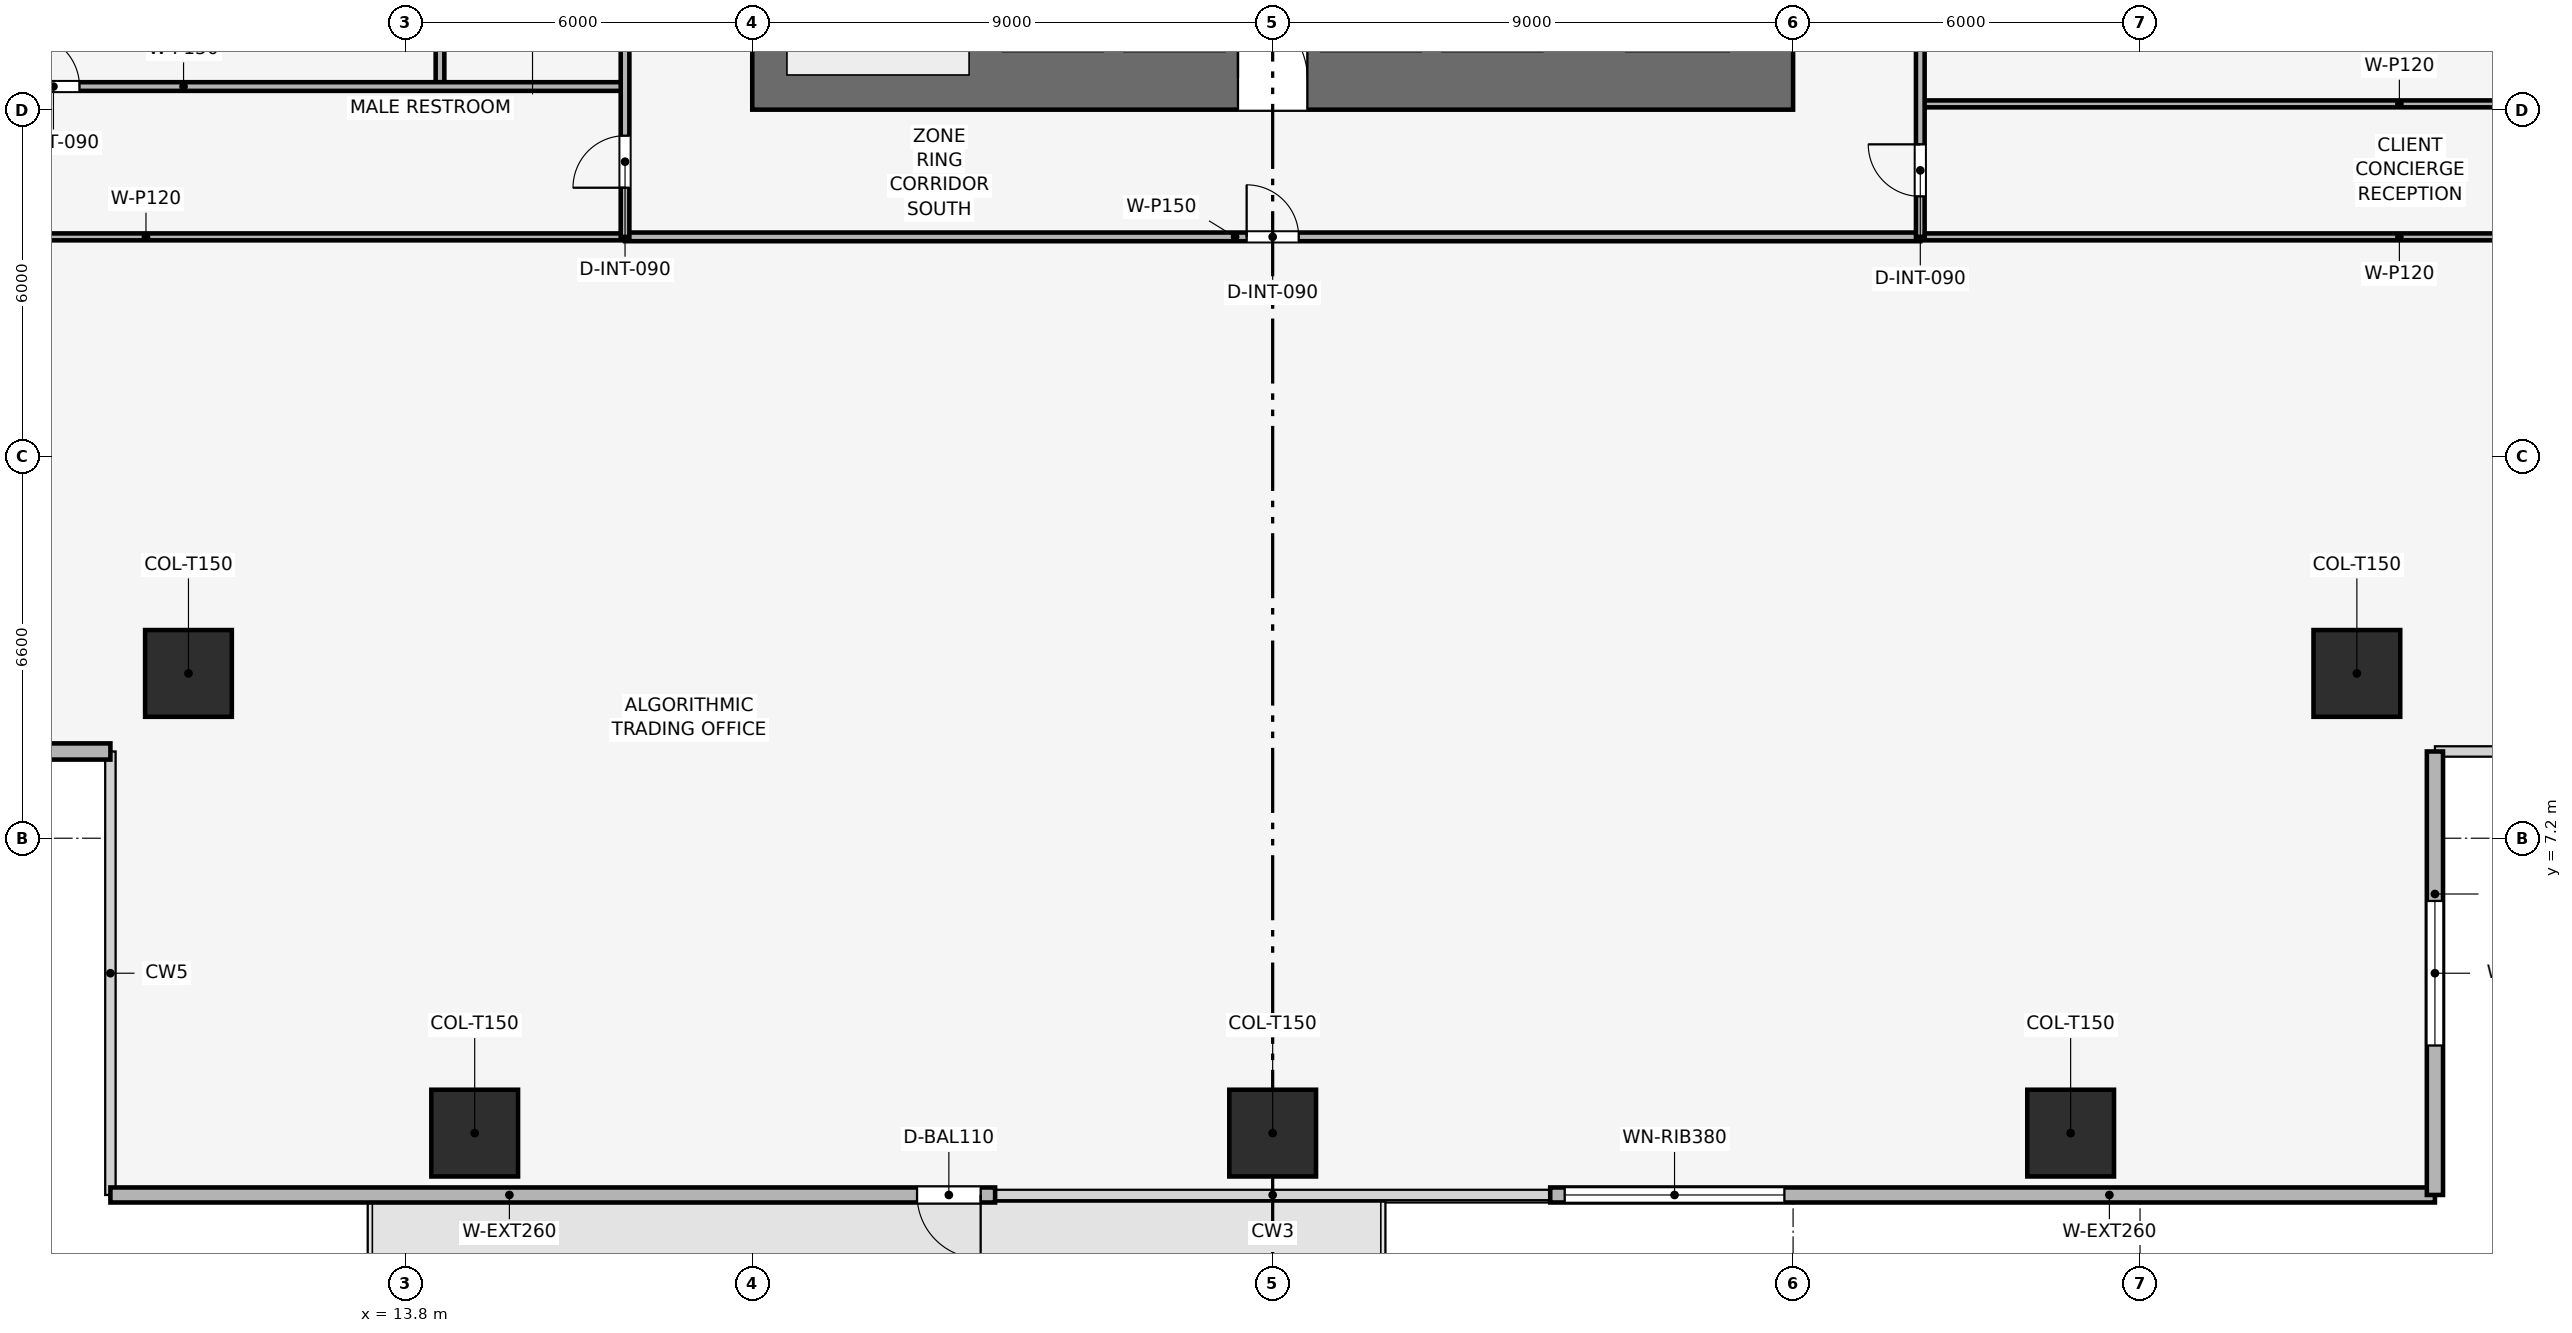
"""IFC4 building model, lengths in metres.
Left out: names, types, materials, properties, quantities, classifications, styles, units other than length and angle.
Written with IfcOpenShell. Run it as: python <this file> out.ifc"""

import sys

from ifc_helpers import new_model, si_unit, direction, frame, frame_2d, origin, origin_2d, place, context, subcontext, project, spatial, rectangle, extrude, element, fill, save


model = new_model("IFC4")
c1 = context("Model", 3, precision=1e-05, world=origin(), true_north=direction((0.0, 1.0)))
c2 = subcontext(c1, "Body", "Model", "MODEL_VIEW")
j1 = project(units=[si_unit("LENGTHUNIT", "METRE"), si_unit("PLANEANGLEUNIT", "RADIAN")], contexts=[c1])
p1 = place(None, origin())
s1 = spatial("IfcSite", under=j1, at=p1, CompositionType="ELEMENT")
p2 = place(p1, origin())
s2 = spatial("IfcBuilding", under=s1, at=p2, CompositionType="ELEMENT")
p3 = place(p2, frame((0.0, 0.0, 30.0)))
s3 = spatial("IfcBuildingStorey", under=s2, at=p3, CompositionType="ELEMENT", Elevation=30.0)
p4 = place(p3, frame((19.8, 20.35, 0.0), z_axis=(0.0, 0.0, 1.0), x_axis=(1.0, 0.0, 0.0)))
e1 = element("IfcWall", 1, at=p4, inside=s3, PredefinedType="SHEAR", context=c2, shape_type="SweptSolid", body=[
    extrude(rectangle(XDim=18.0, YDim=1.1, at=frame_2d((9.0, 0.0))), origin(), (0.0, 0.0, 1.0), 3.9),
])
p5 = place(p4, frame((8.4, 0.0, 0.0)))
e2 = element("IfcOpeningElement", 2, at=p5, cuts=e1, PredefinedType="OPENING", context=c2, shape_type="SweptSolid", body=[
    extrude(rectangle(XDim=1.2, YDim=2.2, at=frame_2d((0.6, 1.1))), frame((0.0, 0.56, 0.0), z_axis=(0.0, -1.0, 0.0), x_axis=(1.0, 0.0, 0.0)), (0.0, 0.0, 1.0), 1.12),
])
for number, where, z_axis, x_axis in (
    (3, (15.0, 2.1, 0.003), (0.0, 0.0, 1.0), (1.0, 0.0, 0.0)),
    (4, (28.8, 2.1, 0.003), (0.0, 0.0, 1.0), (1.0, 0.0, 0.0)),
    (5, (42.6, 2.1, 0.003), (0.0, 0.0, 1.0), (1.0, 0.0, 0.0)),
    (6, (10.05, 10.05, 0.003), (0.0, 0.0, 1.0), (1.0, 0.0, 0.0)),
    (7, (47.55, 10.05, 0.003), (0.0, 0.0, 1.0), (1.0, 0.0, 0.0)),
):
    element("IfcColumn", number, at=place(p3, frame(where, z_axis=z_axis, x_axis=x_axis)), inside=s3, PredefinedType="COLUMN", context=c2, shape_type="SweptSolid", body=[
        extrude(rectangle(XDim=1.5, YDim=1.5, at=origin_2d()), origin(), (0.0, 0.0, 1.0), 3.644),
    ])
p6 = place(p3, frame((48.9, 1.03, 0.0), z_axis=(0.0, 0.0, 1.0), x_axis=(-1.0, 0.0, 0.0)))
e8 = element("IfcWall", 8, at=p6, inside=s3, PredefinedType="SOLIDWALL", context=c2, shape_type="SweptSolid", body=[
    extrude(rectangle(XDim=15.3, YDim=0.26, at=frame_2d((7.65, 0.0))), origin(), (0.0, 0.0, 1.0), 3.65),
])
p7 = place(p6, frame((11.25, 0.0, 0.9)))
e9 = element("IfcOpeningElement", 9, at=p7, cuts=e8, PredefinedType="OPENING", context=c2, shape_type="SweptSolid", body=[
    extrude(rectangle(XDim=3.8, YDim=1.9, at=frame_2d((1.9, 0.95))), frame((0.0, 0.14, 0.0), z_axis=(0.0, -1.0, 0.0), x_axis=(1.0, 0.0, 0.0)), (0.0, 0.0, 1.0), 0.28),
])
p8 = place(p3, frame((24.0, 1.03, 0.0), z_axis=(0.0, 0.0, 1.0), x_axis=(-1.0, 0.0, 0.0)))
e10 = element("IfcWall", 10, at=p8, inside=s3, PredefinedType="SOLIDWALL", context=c2, shape_type="SweptSolid", body=[
    extrude(rectangle(XDim=15.3, YDim=0.26, at=frame_2d((7.65, 0.0))), origin(), (0.0, 0.0, 1.0), 3.65),
])
p9 = place(p8, frame((0.25, 0.0, 0.0)))
e11 = element("IfcOpeningElement", 11, at=p9, cuts=e10, PredefinedType="OPENING", context=c2, shape_type="SweptSolid", body=[
    extrude(rectangle(XDim=1.1, YDim=2.2, at=frame_2d((0.55, 1.1))), frame((0.0, 0.14, 0.0), z_axis=(0.0, -1.0, 0.0), x_axis=(1.0, 0.0, 0.0)), (0.0, 0.0, 1.0), 0.28),
])
p10 = place(p3, frame((8.7, 8.7, 0.0), z_axis=(0.0, 0.0, 1.0), x_axis=(-1.0, 0.0, 0.0)))
e12 = element("IfcWall", 12, at=p10, inside=s3, PredefinedType="SOLIDWALL", context=c2, shape_type="SweptSolid", body=[
    extrude(rectangle(XDim=7.67, YDim=0.28, at=frame_2d((3.835, 0.0))), origin(), (0.0, 0.0, 1.0), 3.65),
])
p11 = place(p10, frame((2.585, 0.0, 0.9)))
e13 = element("IfcOpeningElement", 13, at=p11, cuts=e12, PredefinedType="OPENING", context=c2, shape_type="SweptSolid", body=[
    extrude(rectangle(XDim=2.5, YDim=1.9, at=frame_2d((1.25, 0.95))), frame((0.0, 0.15, 0.0), z_axis=(0.0, -1.0, 0.0), x_axis=(1.0, 0.0, 0.0)), (0.0, 0.0, 1.0), 0.3),
])
p12 = place(p3, frame((48.9, 8.7, 0.0), z_axis=(0.0, 0.0, 1.0), x_axis=(0.0, -1.0, 0.0)))
e14 = element("IfcWall", 14, at=p12, inside=s3, PredefinedType="SOLIDWALL", context=c2, shape_type="SweptSolid", body=[
    extrude(rectangle(XDim=7.67, YDim=0.28, at=frame_2d((3.835, 0.0))), origin(), (0.0, 0.0, 1.0), 3.65),
])
p13 = place(p12, frame((2.585, 0.0, 0.9)))
e15 = element("IfcOpeningElement", 15, at=p13, cuts=e14, PredefinedType="OPENING", context=c2, shape_type="SweptSolid", body=[
    extrude(rectangle(XDim=2.5, YDim=1.9, at=frame_2d((1.25, 0.95))), frame((0.0, 0.15, 0.0), z_axis=(0.0, -1.0, 0.0), x_axis=(1.0, 0.0, 0.0)), (0.0, 0.0, 1.0), 0.3),
])
for number, where, z_axis, x_axis in (
    (16, (1.03, 17.6, 0.0), (0.0, 0.0, 1.0), (1.0, 0.0, 0.0)),
    (17, (40.0, 17.6, 0.0), (0.0, 0.0, 1.0), (1.0, 0.0, 0.0)),
):
    element("IfcWall", number, at=place(p3, frame(where, z_axis=z_axis, x_axis=x_axis)), inside=s3, PredefinedType="PARTITIONING", context=c2, shape_type="SweptSolid", body=[
        extrude(rectangle(XDim=16.57, YDim=0.12, at=frame_2d((8.285, 0.0))), origin(), (0.0, 0.0, 1.0), 2.935),
    ])
p14 = place(p3, frame((14.4, 20.2, 0.0), z_axis=(0.0, 0.0, 1.0), x_axis=(0.0, 1.0, 0.0)))
e18 = element("IfcWall", 18, at=p14, inside=s3, PredefinedType="PARTITIONING", context=c2, shape_type="SweptSolid", body=[
    extrude(rectangle(XDim=8.4, YDim=0.15, at=frame_2d((4.2, 0.0))), origin(), (0.0, 0.0, 1.0), 3.085),
])
p15 = place(p3, frame((1.03, 20.2, 0.0), z_axis=(0.0, 0.0, 1.0), x_axis=(1.0, 0.0, 0.0)))
e19 = element("IfcWall", 19, at=p15, inside=s3, PredefinedType="PARTITIONING", context=c2, shape_type="SweptSolid", body=[
    extrude(rectangle(XDim=16.57, YDim=0.15, at=frame_2d((8.285, 0.0))), origin(), (0.0, 0.0, 1.0), 2.935),
])
p16 = place(p15, frame((6.235, 0.0, 0.0)))
e20 = element("IfcOpeningElement", 20, at=p16, cuts=e19, PredefinedType="OPENING", context=c2, shape_type="SweptSolid", body=[
    extrude(rectangle(XDim=0.9, YDim=2.1, at=frame_2d((0.45, 1.05))), frame((0.0, 0.085, 0.0), z_axis=(0.0, -1.0, 0.0), x_axis=(1.0, 0.0, 0.0)), (0.0, 0.0, 1.0), 0.17),
])
p17 = place(p3, frame((40.0, 19.9, 0.0), z_axis=(0.0, 0.0, 1.0), x_axis=(1.0, 0.0, 0.0)))
e21 = element("IfcWall", 21, at=p17, inside=s3, PredefinedType="PARTITIONING", context=c2, shape_type="SweptSolid", body=[
    extrude(rectangle(XDim=16.57, YDim=0.12, at=frame_2d((8.285, 0.0))), origin(), (0.0, 0.0, 1.0), 2.935),
])
p18 = place(p3, frame((17.6, 17.6, 0.0), z_axis=(0.0, 0.0, 1.0), x_axis=(1.0, 0.0, 0.0)))
e22 = element("IfcWall", 22, at=p18, inside=s3, PredefinedType="PARTITIONING", context=c2, shape_type="SweptSolid", body=[
    extrude(rectangle(XDim=22.4, YDim=0.15, at=frame_2d((11.2, 0.0))), origin(), (0.0, 0.0, 1.0), 3.085),
])
p19 = place(p18, frame((10.75, 0.0, 0.0)))
e23 = element("IfcOpeningElement", 23, at=p19, cuts=e22, PredefinedType="OPENING", context=c2, shape_type="SweptSolid", body=[
    extrude(rectangle(XDim=0.9, YDim=2.1, at=frame_2d((0.45, 1.05))), frame((0.0, 0.085, 0.0), z_axis=(0.0, -1.0, 0.0), x_axis=(1.0, 0.0, 0.0)), (0.0, 0.0, 1.0), 0.17),
])
p20 = place(p3, frame((17.6, 17.6, 0.0), z_axis=(0.0, 0.0, 1.0), x_axis=(0.0, 1.0, 0.0)))
e24 = element("IfcWall", 24, at=p20, inside=s3, PredefinedType="PARTITIONING", context=c2, shape_type="SweptSolid", body=[
    extrude(rectangle(XDim=22.4, YDim=0.15, at=frame_2d((11.2, 0.0))), origin(), (0.0, 0.0, 1.0), 3.085),
])
p21 = place(p20, frame((0.85, 0.0, 0.0)))
e25 = element("IfcOpeningElement", 25, at=p21, cuts=e24, PredefinedType="OPENING", context=c2, shape_type="SweptSolid", body=[
    extrude(rectangle(XDim=0.9, YDim=2.1, at=frame_2d((0.45, 1.05))), frame((0.0, 0.085, 0.0), z_axis=(0.0, -1.0, 0.0), x_axis=(1.0, 0.0, 0.0)), (0.0, 0.0, 1.0), 0.17),
])
p22 = place(p20, frame((3.55, 0.0, 0.0)))
e26 = element("IfcOpeningElement", 26, at=p22, cuts=e24, PredefinedType="OPENING", context=c2, shape_type="SweptSolid", body=[
    extrude(rectangle(XDim=0.9, YDim=2.1, at=frame_2d((0.45, 1.05))), frame((0.0, 0.085, 0.0), z_axis=(0.0, -1.0, 0.0), x_axis=(1.0, 0.0, 0.0)), (0.0, 0.0, 1.0), 0.17),
])
p23 = place(p20, frame((6.45, 0.0, 0.0)))
e27 = element("IfcOpeningElement", 27, at=p23, cuts=e24, PredefinedType="OPENING", context=c2, shape_type="SweptSolid", body=[
    extrude(rectangle(XDim=0.9, YDim=2.1, at=frame_2d((0.45, 1.05))), frame((0.0, 0.085, 0.0), z_axis=(0.0, -1.0, 0.0), x_axis=(1.0, 0.0, 0.0)), (0.0, 0.0, 1.0), 0.17),
])
p24 = place(p20, frame((9.2, 0.0, 0.0)))
e28 = element("IfcOpeningElement", 28, at=p24, cuts=e24, PredefinedType="OPENING", context=c2, shape_type="SweptSolid", body=[
    extrude(rectangle(XDim=0.95, YDim=2.1, at=frame_2d((0.475, 1.05))), frame((0.0, 0.085, 0.0), z_axis=(0.0, -1.0, 0.0), x_axis=(1.0, 0.0, 0.0)), (0.0, 0.0, 1.0), 0.17),
])
p25 = place(p20, frame((16.25, 0.0, 0.0)))
e29 = element("IfcOpeningElement", 29, at=p25, cuts=e24, PredefinedType="OPENING", context=c2, shape_type="SweptSolid", body=[
    extrude(rectangle(XDim=0.9, YDim=2.1, at=frame_2d((0.45, 1.05))), frame((0.0, 0.085, 0.0), z_axis=(0.0, -1.0, 0.0), x_axis=(1.0, 0.0, 0.0)), (0.0, 0.0, 1.0), 0.17),
])
p26 = place(p3, frame((40.0, 17.6, 0.0), z_axis=(0.0, 0.0, 1.0), x_axis=(0.0, 1.0, 0.0)))
e30 = element("IfcWall", 30, at=p26, inside=s3, PredefinedType="PARTITIONING", context=c2, shape_type="SweptSolid", body=[
    extrude(rectangle(XDim=22.4, YDim=0.15, at=frame_2d((11.2, 0.0))), origin(), (0.0, 0.0, 1.0), 3.085),
])
p27 = place(p26, frame((0.7, 0.0, 0.0)))
e31 = element("IfcOpeningElement", 31, at=p27, cuts=e30, PredefinedType="OPENING", context=c2, shape_type="SweptSolid", body=[
    extrude(rectangle(XDim=0.9, YDim=2.1, at=frame_2d((0.45, 1.05))), frame((0.0, 0.085, 0.0), z_axis=(0.0, -1.0, 0.0), x_axis=(1.0, 0.0, 0.0)), (0.0, 0.0, 1.0), 0.17),
])
p28 = place(p26, frame((6.404, 0.0, 0.0)))
e32 = element("IfcOpeningElement", 32, at=p28, cuts=e30, PredefinedType="OPENING", context=c2, shape_type="SweptSolid", body=[
    extrude(rectangle(XDim=0.9, YDim=2.1, at=frame_2d((0.45, 1.05))), frame((0.0, 0.085, 0.0), z_axis=(0.0, -1.0, 0.0), x_axis=(1.0, 0.0, 0.0)), (0.0, 0.0, 1.0), 0.17),
])
p29 = place(p26, frame((16.454, 0.0, 0.0)))
e33 = element("IfcOpeningElement", 33, at=p29, cuts=e30, PredefinedType="OPENING", context=c2, shape_type="SweptSolid", body=[
    extrude(rectangle(XDim=0.9, YDim=2.1, at=frame_2d((0.45, 1.05))), frame((0.0, 0.085, 0.0), z_axis=(0.0, -1.0, 0.0), x_axis=(1.0, 0.0, 0.0)), (0.0, 0.0, 1.0), 0.17),
])
p30 = place(p9, origin())
e34 = element("IfcDoor", 34, at=p30, inside=s3, OperationType="SINGLE_SWING_LEFT", PredefinedType="DOOR", context=c2, shape_type="SweptSolid", body=[
    extrude(rectangle(XDim=1.1, YDim=2.2, at=frame_2d((0.55, 1.1))), frame((0.0, 0.025, 0.0), z_axis=(0.0, -1.0, 0.0), x_axis=(1.0, 0.0, 0.0)), (0.0, 0.0, 1.0), 0.05),
])
fill(e11, e34)
p31 = place(p7, origin())
e35 = element("IfcWindow", 35, at=p31, inside=s3, PartitioningType="SINGLE_PANEL", PredefinedType="WINDOW", context=c2, shape_type="SweptSolid", body=[
    extrude(rectangle(XDim=3.8, YDim=1.9, at=frame_2d((1.9, 0.95))), frame((0.0, 0.03, 0.0), z_axis=(0.0, -1.0, 0.0), x_axis=(1.0, 0.0, 0.0)), (0.0, 0.0, 1.0), 0.06),
])
fill(e9, e35)
p32 = place(p13, origin())
e36 = element("IfcWindow", 36, at=p32, inside=s3, PartitioningType="SINGLE_PANEL", PredefinedType="WINDOW", context=c2, shape_type="SweptSolid", body=[
    extrude(rectangle(XDim=2.5, YDim=1.9, at=frame_2d((1.25, 0.95))), frame((0.0, 0.03, 0.0), z_axis=(0.0, -1.0, 0.0), x_axis=(1.0, 0.0, 0.0)), (0.0, 0.0, 1.0), 0.06),
])
fill(e15, e36)
p33 = place(p16, origin())
e37 = element("IfcDoor", 37, at=p33, inside=s3, OperationType="SINGLE_SWING_LEFT", PredefinedType="DOOR", context=c2, shape_type="SweptSolid", body=[
    extrude(rectangle(XDim=0.9, YDim=2.1, at=frame_2d((0.45, 1.05))), frame((0.0, 0.025, 0.0), z_axis=(0.0, -1.0, 0.0), x_axis=(1.0, 0.0, 0.0)), (0.0, 0.0, 1.0), 0.05),
])
fill(e20, e37)
p34 = place(p19, origin())
e38 = element("IfcDoor", 38, at=p34, inside=s3, OperationType="SINGLE_SWING_LEFT", PredefinedType="DOOR", context=c2, shape_type="SweptSolid", body=[
    extrude(rectangle(XDim=0.9, YDim=2.1, at=frame_2d((0.45, 1.05))), frame((0.0, 0.025, 0.0), z_axis=(0.0, -1.0, 0.0), x_axis=(1.0, 0.0, 0.0)), (0.0, 0.0, 1.0), 0.05),
])
fill(e23, e38)
p35 = place(p21, origin())
e39 = element("IfcDoor", 39, at=p35, inside=s3, OperationType="SINGLE_SWING_LEFT", PredefinedType="DOOR", context=c2, shape_type="SweptSolid", body=[
    extrude(rectangle(XDim=0.9, YDim=2.1, at=frame_2d((0.45, 1.05))), frame((0.0, 0.025, 0.0), z_axis=(0.0, -1.0, 0.0), x_axis=(1.0, 0.0, 0.0)), (0.0, 0.0, 1.0), 0.05),
])
fill(e25, e39)
p36 = place(p27, origin())
e40 = element("IfcDoor", 40, at=p36, inside=s3, OperationType="SINGLE_SWING_RIGHT", PredefinedType="DOOR", context=c2, shape_type="SweptSolid", body=[
    extrude(rectangle(XDim=0.9, YDim=2.1, at=frame_2d((0.45, 1.05))), frame((0.0, 0.025, 0.0), z_axis=(0.0, -1.0, 0.0), x_axis=(1.0, 0.0, 0.0)), (0.0, 0.0, 1.0), 0.05),
])
fill(e31, e40)
p37 = place(p5, origin())
e41 = element("IfcDoor", 41, at=p37, inside=s3, OperationType="SINGLE_SWING_LEFT", PredefinedType="DOOR", context=c2, shape_type="SweptSolid", body=[
    extrude(rectangle(XDim=1.2, YDim=2.2, at=frame_2d((0.6, 1.1))), frame((0.0, 0.025, 0.0), z_axis=(0.0, -1.0, 0.0), x_axis=(1.0, 0.0, 0.0)), (0.0, 0.0, 1.0), 0.05),
])
fill(e2, e41)
save(model, sys.argv[1])
